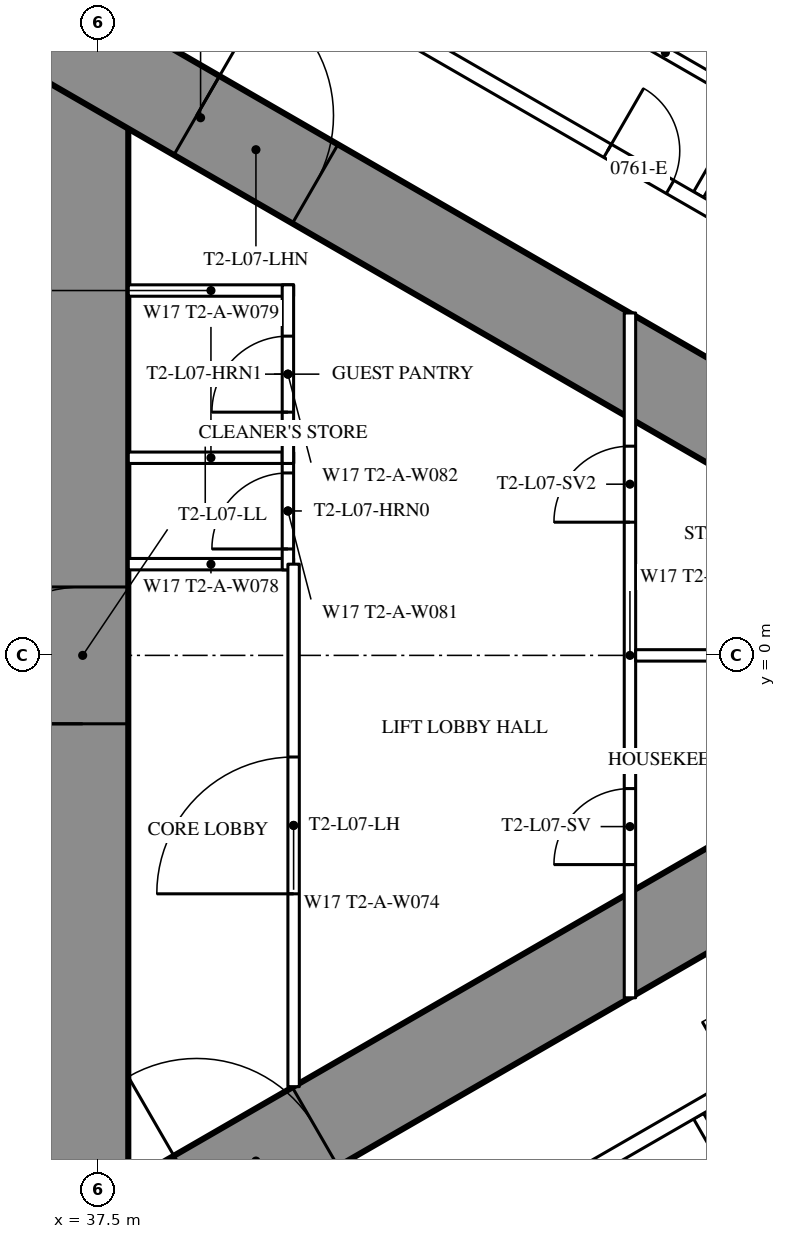
"""IFC4 building model, lengths in metres.
Left out: names, types, materials, properties, quantities, classifications, styles, units other than length and angle.
Written with IfcOpenShell. Run it as: python <this file> out.ifc"""

import sys

from ifc_helpers import new_model, si_unit, direction, frame, frame_2d, origin, place, context, subcontext, project, spatial, rectangle, extrude, element, fill, save


model = new_model("IFC4")
c1 = context("Model", 3, precision=1e-05, world=origin(), true_north=direction((0.0, 1.0)))
c2 = subcontext(c1, "Body", "Model", "MODEL_VIEW")
j1 = project(units=[si_unit("LENGTHUNIT", "METRE"), si_unit("PLANEANGLEUNIT", "RADIAN")], contexts=[c1])
p1 = place(None, origin())
s1 = spatial("IfcSite", under=j1, at=p1, CompositionType="ELEMENT")
p2 = place(p1, origin())
s2 = spatial("IfcBuilding", under=s1, at=p2, CompositionType="ELEMENT")
p3 = place(p2, frame((0.0, 0.0, 32.0)))
s3 = spatial("IfcBuildingStorey", under=s2, at=p3, CompositionType="ELEMENT", Elevation=32.0)
p4 = place(p3, frame((37.3, -8.6, 0.0), z_axis=(0.0, 0.0, 1.0), x_axis=(0.0, 1.0, 0.0)))
e1 = element("IfcWall", 1, at=p4, inside=s3, PredefinedType="SHEAR", context=c2, shape_type="SweptSolid", body=[
    extrude(rectangle(XDim=17.2, YDim=1.2, at=frame_2d((8.6, 0.0))), origin(), (0.0, 0.0, 1.0), 3.5),
])
p5 = place(p4, frame((7.7, 0.0, 0.0)))
e2 = element("IfcOpeningElement", 2, at=p5, cuts=e1, PredefinedType="OPENING", context=c2, shape_type="SweptSolid", body=[
    extrude(rectangle(XDim=1.8, YDim=2.2, at=frame_2d((0.9, 1.1))), frame((0.0, 0.61, 0.0), z_axis=(0.0, -1.0, 0.0), x_axis=(1.0, 0.0, 0.0)), (0.0, 0.0, 1.0), 1.22),
])
p6 = place(p3, frame((27.2, -13.8, 0.0), z_axis=(0.0, 0.0, 1.0), x_axis=(0.866027159892, 0.499996958321, 0.0)))
e3 = element("IfcWall", 3, at=p6, inside=s3, PredefinedType="SHEAR", context=c2, shape_type="SweptSolid", body=[
    extrude(rectangle(XDim=27.947, YDim=1.2, at=frame_2d((13.973, 0.0))), origin(), (0.0, 0.0, 1.0), 3.5),
])
p7 = place(p6, frame((4.6, 0.0, 0.0)))
e4 = element("IfcOpeningElement", 4, at=p7, cuts=e3, PredefinedType="OPENING", context=c2, shape_type="SweptSolid", body=[
    extrude(rectangle(XDim=1.0, YDim=2.2, at=frame_2d((0.5, 1.1))), frame((0.0, 0.61, 0.0), z_axis=(0.0, -1.0, 0.0), x_axis=(1.0, 0.0, 0.0)), (0.0, 0.0, 1.0), 1.22),
])
p8 = place(p6, frame((13.395, 0.0, 0.0)))
e5 = element("IfcOpeningElement", 5, at=p8, cuts=e3, PredefinedType="OPENING", context=c2, shape_type="SweptSolid", body=[
    extrude(rectangle(XDim=1.8, YDim=2.2, at=frame_2d((0.9, 1.1))), frame((0.0, 0.61, 0.0), z_axis=(0.0, -1.0, 0.0), x_axis=(1.0, 0.0, 0.0)), (0.0, 0.0, 1.0), 1.22),
])
p9 = place(p3, frame((27.2, 13.8, 0.0), z_axis=(0.0, 0.0, 1.0), x_axis=(0.866024515034, -0.500001539357, 0.0)))
e6 = element("IfcWall", 6, at=p9, inside=s3, PredefinedType="SHEAR", context=c2, shape_type="SweptSolid", body=[
    extrude(rectangle(XDim=26.907, YDim=1.2, at=frame_2d((13.454, 0.0))), origin(), (0.0, 0.0, 1.0), 3.5),
])
p10 = place(p9, frame((4.6, 0.0, 0.0)))
e7 = element("IfcOpeningElement", 7, at=p10, cuts=e6, PredefinedType="OPENING", context=c2, shape_type="SweptSolid", body=[
    extrude(rectangle(XDim=1.0, YDim=2.2, at=frame_2d((0.5, 1.1))), frame((0.0, 0.61, 0.0), z_axis=(0.0, -1.0, 0.0), x_axis=(1.0, 0.0, 0.0)), (0.0, 0.0, 1.0), 1.22),
])
p11 = place(p9, frame((13.395, 0.0, 0.0)))
e8 = element("IfcOpeningElement", 8, at=p11, cuts=e6, PredefinedType="OPENING", context=c2, shape_type="SweptSolid", body=[
    extrude(rectangle(XDim=1.8, YDim=2.2, at=frame_2d((0.9, 1.1))), frame((0.0, 0.61, 0.0), z_axis=(0.0, -1.0, 0.0), x_axis=(1.0, 0.0, 0.0)), (0.0, 0.0, 1.0), 1.22),
])
p12 = place(p3, frame((45.403, -6.062, 0.0), z_axis=(0.0, 0.0, 1.0), x_axis=(0.500007077968, -0.866021317279, 0.0)))
e9 = element("IfcWall", 9, at=p12, inside=s3, PredefinedType="PARTITIONING", context=c2, shape_type="SweptSolid", body=[
    extrude(rectangle(XDim=12.721, YDim=0.15, at=frame_2d((6.361, 0.0))), origin(), (0.0, 0.0, 1.0), 3.25),
])
p13 = place(p3, frame((45.403, 6.062, 0.0), z_axis=(0.0, 0.0, 1.0), x_axis=(0.500013434677, 0.866017647131, 0.0)))
e10 = element("IfcWall", 10, at=p13, inside=s3, PredefinedType="PARTITIONING", context=c2, shape_type="SweptSolid", body=[
    extrude(rectangle(XDim=9.902, YDim=0.15, at=frame_2d((4.951, 0.0))), origin(), (0.0, 0.0, 1.0), 2.25),
])
p14 = place(p3, frame((37.96, -10.243, 0.0), z_axis=(0.0, 0.0, 1.0), x_axis=(0.866026429433, 0.499998223521, 0.0)))
e11 = element("IfcWall", 11, at=p14, inside=s3, PredefinedType="PARTITIONING", context=c2, shape_type="SweptSolid", body=[
    extrude(rectangle(XDim=20.487, YDim=0.2, at=frame_2d((10.243, 0.0))), origin(), (0.0, 0.0, 1.0), 3.25),
])
p15 = place(p14, frame((4.575, 0.0, 0.0)))
e12 = element("IfcOpeningElement", 12, at=p15, cuts=e11, PredefinedType="OPENING", context=c2, shape_type="SweptSolid", body=[
    extrude(rectangle(XDim=0.95, YDim=2.2, at=frame_2d((0.475, 1.1))), frame((0.0, 0.11, 0.0), z_axis=(0.0, -1.0, 0.0), x_axis=(1.0, 0.0, 0.0)), (0.0, 0.0, 1.0), 0.22),
])
p16 = place(p14, frame((9.199, 0.0, 0.0)))
e13 = element("IfcOpeningElement", 13, at=p16, cuts=e11, PredefinedType="OPENING", context=c2, shape_type="SweptSolid", body=[
    extrude(rectangle(XDim=0.95, YDim=2.2, at=frame_2d((0.475, 1.1))), frame((0.0, 0.11, 0.0), z_axis=(0.0, -1.0, 0.0), x_axis=(1.0, 0.0, 0.0)), (0.0, 0.0, 1.0), 0.22),
])
p17 = place(p14, frame((15.599, 0.0, 0.0)))
e14 = element("IfcOpeningElement", 14, at=p17, cuts=e11, PredefinedType="OPENING", context=c2, shape_type="SweptSolid", body=[
    extrude(rectangle(XDim=0.95, YDim=2.2, at=frame_2d((0.475, 1.1))), frame((0.0, 0.11, 0.0), z_axis=(0.0, -1.0, 0.0), x_axis=(1.0, 0.0, 0.0)), (0.0, 0.0, 1.0), 0.22),
])
p18 = place(p14, frame((2.875, 0.0, 0.0)))
e15 = element("IfcOpeningElement", 15, at=p18, cuts=e11, PredefinedType="OPENING", context=c2, shape_type="SweptSolid", body=[
    extrude(rectangle(XDim=0.95, YDim=2.2, at=frame_2d((0.475, 1.1))), frame((0.0, 0.11, 0.0), z_axis=(0.0, -1.0, 0.0), x_axis=(1.0, 0.0, 0.0)), (0.0, 0.0, 1.0), 0.22),
])
p19 = place(p3, frame((41.619, 8.131, 0.0), z_axis=(0.0, 0.0, 1.0), x_axis=(0.86603245327, -0.499987789734, 0.0)))
e16 = element("IfcWall", 16, at=p19, inside=s3, PredefinedType="PARTITIONING", context=c2, shape_type="SweptSolid", body=[
    extrude(rectangle(XDim=16.142, YDim=0.2, at=frame_2d((8.071, 0.0))), origin(), (0.0, 0.0, 1.0), 3.25),
])
p20 = place(p19, frame((9.024, 0.0, 0.0)))
e17 = element("IfcOpeningElement", 17, at=p20, cuts=e16, PredefinedType="OPENING", context=c2, shape_type="SweptSolid", body=[
    extrude(rectangle(XDim=0.95, YDim=2.2, at=frame_2d((0.475, 1.1))), frame((0.0, 0.11, 0.0), z_axis=(0.0, -1.0, 0.0), x_axis=(1.0, 0.0, 0.0)), (0.0, 0.0, 1.0), 0.22),
])
p21 = place(p19, frame((7.037, 0.0, 0.0)))
e18 = element("IfcOpeningElement", 18, at=p21, cuts=e16, PredefinedType="OPENING", context=c2, shape_type="SweptSolid", body=[
    extrude(rectangle(XDim=0.95, YDim=2.2, at=frame_2d((0.475, 1.1))), frame((0.0, 0.11, 0.0), z_axis=(0.0, -1.0, 0.0), x_axis=(1.0, 0.0, 0.0)), (0.0, 0.0, 1.0), 0.22),
])
p22 = place(p19, frame((2.987, 0.0, 0.0)))
e19 = element("IfcOpeningElement", 19, at=p22, cuts=e16, PredefinedType="OPENING", context=c2, shape_type="SweptSolid", body=[
    extrude(rectangle(XDim=0.95, YDim=2.2, at=frame_2d((0.475, 1.1))), frame((0.0, 0.11, 0.0), z_axis=(0.0, -1.0, 0.0), x_axis=(1.0, 0.0, 0.0)), (0.0, 0.0, 1.0), 0.22),
])
p23 = place(p3, frame((43.895, 8.549, 0.0), z_axis=(0.0, 0.0, 1.0), x_axis=(0.866031185235, -0.4999899861, 0.0)))
e20 = element("IfcWall", 20, at=p23, inside=s3, PredefinedType="PARTITIONING", context=c2, shape_type="SweptSolid", body=[
    extrude(rectangle(XDim=2.475, YDim=0.15, at=frame_2d((1.238, 0.0))), origin(), (0.0, 0.0, 1.0), 3.25),
])
for number, where, z_axis, x_axis in (
    (21, (37.9, 1.2, 0.0), (0.0, 0.0, 1.0), (1.0, 0.0, 0.0)),
    (22, (37.9, 2.6, 0.0), (0.0, 0.0, 1.0), (1.0, 0.0, 0.0)),
    (23, (37.9, 4.8, 0.0), (0.0, 0.0, 1.0), (1.0, 0.0, 0.0)),
):
    element("IfcWall", number, at=place(p3, frame(where, z_axis=z_axis, x_axis=x_axis)), inside=s3, PredefinedType="PARTITIONING", context=c2, shape_type="SweptSolid", body=[
        extrude(rectangle(XDim=2.175, YDim=0.15, at=frame_2d((1.087, 0.0))), origin(), (0.0, 0.0, 1.0), 3.25),
    ])
p24 = place(p3, frame((40.0, 1.125, 0.0), z_axis=(0.0, 0.0, 1.0), x_axis=(0.0, 1.0, 0.0)))
e24 = element("IfcWall", 24, at=p24, inside=s3, PredefinedType="PARTITIONING", context=c2, shape_type="SweptSolid", body=[
    extrude(rectangle(XDim=1.55, YDim=0.15, at=frame_2d((0.775, 0.0))), origin(), (0.0, 0.0, 1.0), 3.25),
])
p25 = place(p24, frame((0.275, 0.0, 0.0)))
e25 = element("IfcOpeningElement", 25, at=p25, cuts=e24, PredefinedType="OPENING", context=c2, shape_type="SweptSolid", body=[
    extrude(rectangle(XDim=1.0, YDim=2.2, at=frame_2d((0.5, 1.1))), frame((0.0, 0.085, 0.0), z_axis=(0.0, -1.0, 0.0), x_axis=(1.0, 0.0, 0.0)), (0.0, 0.0, 1.0), 0.17),
])
p26 = place(p3, frame((40.0, 2.525, 0.0), z_axis=(0.0, 0.0, 1.0), x_axis=(0.0, 1.0, 0.0)))
e26 = element("IfcWall", 26, at=p26, inside=s3, PredefinedType="PARTITIONING", context=c2, shape_type="SweptSolid", body=[
    extrude(rectangle(XDim=2.35, YDim=0.15, at=frame_2d((1.175, 0.0))), origin(), (0.0, 0.0, 1.0), 3.25),
])
p27 = place(p26, frame((0.675, 0.0, 0.0)))
e27 = element("IfcOpeningElement", 27, at=p27, cuts=e26, PredefinedType="OPENING", context=c2, shape_type="SweptSolid", body=[
    extrude(rectangle(XDim=1.0, YDim=2.2, at=frame_2d((0.5, 1.1))), frame((0.0, 0.085, 0.0), z_axis=(0.0, -1.0, 0.0), x_axis=(1.0, 0.0, 0.0)), (0.0, 0.0, 1.0), 0.17),
])
p28 = place(p3, frame((40.075, -5.674, 0.0), z_axis=(0.0, 0.0, 1.0), x_axis=(0.0, 1.0, 0.0)))
e28 = element("IfcWall", 28, at=p28, inside=s3, PredefinedType="PARTITIONING", context=c2, shape_type="SweptSolid", body=[
    extrude(rectangle(XDim=6.874, YDim=0.15, at=frame_2d((3.437, 0.0))), origin(), (0.0, 0.0, 1.0), 3.25),
])
p29 = place(p28, frame((2.537, 0.0, 0.0)))
e29 = element("IfcOpeningElement", 29, at=p29, cuts=e28, PredefinedType="OPENING", context=c2, shape_type="SweptSolid", body=[
    extrude(rectangle(XDim=1.8, YDim=2.2, at=frame_2d((0.9, 1.1))), frame((0.0, 0.085, 0.0), z_axis=(0.0, -1.0, 0.0), x_axis=(1.0, 0.0, 0.0)), (0.0, 0.0, 1.0), 0.17),
])
p30 = place(p3, frame((44.5, -4.505, 0.0), z_axis=(0.0, 0.0, 1.0), x_axis=(0.0, 1.0, 0.0)))
e30 = element("IfcWall", 30, at=p30, inside=s3, PredefinedType="PARTITIONING", context=c2, shape_type="SweptSolid", body=[
    extrude(rectangle(XDim=9.009, YDim=0.15, at=frame_2d((4.505, 0.0))), origin(), (0.0, 0.0, 1.0), 2.45),
])
p31 = place(p30, frame((1.752, 0.0, 0.0)))
e31 = element("IfcOpeningElement", 31, at=p31, cuts=e30, PredefinedType="OPENING", context=c2, shape_type="SweptSolid", body=[
    extrude(rectangle(XDim=1.0, YDim=2.2, at=frame_2d((0.5, 1.1))), frame((0.0, 0.085, 0.0), z_axis=(0.0, -1.0, 0.0), x_axis=(1.0, 0.0, 0.0)), (0.0, 0.0, 1.0), 0.17),
])
p32 = place(p30, frame((6.257, 0.0, 0.0)))
e32 = element("IfcOpeningElement", 32, at=p32, cuts=e30, PredefinedType="OPENING", context=c2, shape_type="SweptSolid", body=[
    extrude(rectangle(XDim=1.0, YDim=2.2, at=frame_2d((0.5, 1.1))), frame((0.0, 0.085, 0.0), z_axis=(0.0, -1.0, 0.0), x_axis=(1.0, 0.0, 0.0)), (0.0, 0.0, 1.0), 0.17),
])
p33 = place(p3, frame((44.575, 0.0, 0.0), z_axis=(0.0, 0.0, 1.0), x_axis=(1.0, 0.0, 0.0)))
e33 = element("IfcWall", 33, at=p33, inside=s3, PredefinedType="PARTITIONING", context=c2, shape_type="SweptSolid", body=[
    extrude(rectangle(XDim=7.727, YDim=0.15, at=frame_2d((3.864, 0.0))), origin(), (0.0, 0.0, 1.0), 2.25),
])
p34 = place(p22, origin())
e34 = element("IfcDoor", 34, at=p34, inside=s3, OperationType="SINGLE_SWING_LEFT", PredefinedType="DOOR", context=c2, shape_type="SweptSolid", body=[
    extrude(rectangle(XDim=0.95, YDim=2.2, at=frame_2d((0.475, 1.1))), frame((0.0, 0.025, 0.0), z_axis=(0.0, -1.0, 0.0), x_axis=(1.0, 0.0, 0.0)), (0.0, 0.0, 1.0), 0.05),
])
fill(e19, e34)
p35 = place(p25, origin())
e35 = element("IfcDoor", 35, at=p35, inside=s3, OperationType="SINGLE_SWING_LEFT", PredefinedType="DOOR", context=c2, shape_type="SweptSolid", body=[
    extrude(rectangle(XDim=1.0, YDim=2.2, at=frame_2d((0.5, 1.1))), frame((0.0, 0.025, 0.0), z_axis=(0.0, -1.0, 0.0), x_axis=(1.0, 0.0, 0.0)), (0.0, 0.0, 1.0), 0.05),
])
fill(e25, e35)
p36 = place(p27, origin())
e36 = element("IfcDoor", 36, at=p36, inside=s3, OperationType="SINGLE_SWING_LEFT", PredefinedType="DOOR", context=c2, shape_type="SweptSolid", body=[
    extrude(rectangle(XDim=1.0, YDim=2.2, at=frame_2d((0.5, 1.1))), frame((0.0, 0.025, 0.0), z_axis=(0.0, -1.0, 0.0), x_axis=(1.0, 0.0, 0.0)), (0.0, 0.0, 1.0), 0.05),
])
fill(e27, e36)
p37 = place(p29, origin())
e37 = element("IfcDoor", 37, at=p37, inside=s3, OperationType="DOUBLE_DOOR_SINGLE_SWING", PredefinedType="DOOR", context=c2, shape_type="SweptSolid", body=[
    extrude(rectangle(XDim=1.8, YDim=2.2, at=frame_2d((0.9, 1.1))), frame((0.0, 0.025, 0.0), z_axis=(0.0, -1.0, 0.0), x_axis=(1.0, 0.0, 0.0)), (0.0, 0.0, 1.0), 0.05),
])
fill(e29, e37)
p38 = place(p31, origin())
e38 = element("IfcDoor", 38, at=p38, inside=s3, OperationType="SINGLE_SWING_LEFT", PredefinedType="DOOR", context=c2, shape_type="SweptSolid", body=[
    extrude(rectangle(XDim=1.0, YDim=2.2, at=frame_2d((0.5, 1.1))), frame((0.0, 0.025, 0.0), z_axis=(0.0, -1.0, 0.0), x_axis=(1.0, 0.0, 0.0)), (0.0, 0.0, 1.0), 0.05),
])
fill(e31, e38)
p39 = place(p32, origin())
e39 = element("IfcDoor", 39, at=p39, inside=s3, OperationType="SINGLE_SWING_LEFT", PredefinedType="DOOR", context=c2, shape_type="SweptSolid", body=[
    extrude(rectangle(XDim=1.0, YDim=2.2, at=frame_2d((0.5, 1.1))), frame((0.0, 0.025, 0.0), z_axis=(0.0, -1.0, 0.0), x_axis=(1.0, 0.0, 0.0)), (0.0, 0.0, 1.0), 0.05),
])
fill(e32, e39)
p40 = place(p8, origin())
e40 = element("IfcDoor", 40, at=p40, inside=s3, OperationType="DOUBLE_DOOR_SINGLE_SWING", PredefinedType="DOOR", context=c2, shape_type="SweptSolid", body=[
    extrude(rectangle(XDim=1.8, YDim=2.2, at=frame_2d((0.9, 1.1))), frame((0.0, 0.025, 0.0), z_axis=(0.0, -1.0, 0.0), x_axis=(1.0, 0.0, 0.0)), (0.0, 0.0, 1.0), 0.05),
])
fill(e5, e40)
p41 = place(p11, origin())
e41 = element("IfcDoor", 41, at=p41, inside=s3, OperationType="DOUBLE_DOOR_SINGLE_SWING", PredefinedType="DOOR", context=c2, shape_type="SweptSolid", body=[
    extrude(rectangle(XDim=1.8, YDim=2.2, at=frame_2d((0.9, 1.1))), frame((0.0, 0.025, 0.0), z_axis=(0.0, -1.0, 0.0), x_axis=(1.0, 0.0, 0.0)), (0.0, 0.0, 1.0), 0.05),
])
fill(e8, e41)
p42 = place(p5, origin())
e42 = element("IfcDoor", 42, at=p42, inside=s3, OperationType="DOUBLE_DOOR_SINGLE_SWING", PredefinedType="DOOR", context=c2, shape_type="SweptSolid", body=[
    extrude(rectangle(XDim=1.8, YDim=2.2, at=frame_2d((0.9, 1.1))), frame((0.0, 0.025, 0.0), z_axis=(0.0, -1.0, 0.0), x_axis=(1.0, 0.0, 0.0)), (0.0, 0.0, 1.0), 0.05),
])
fill(e2, e42)
save(model, sys.argv[1])
